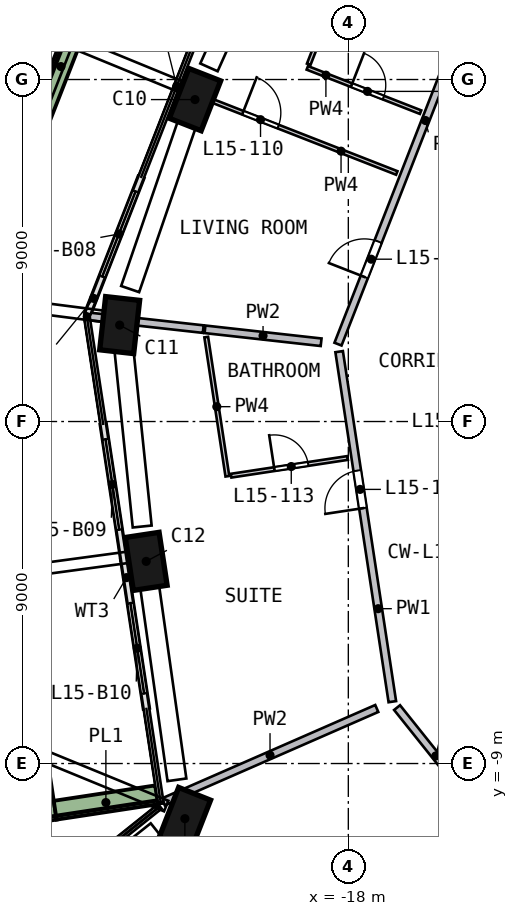
"""IFC4 building model, lengths in metres.
Left out: names, types, materials, properties, quantities, classifications, styles, units other than length and angle.
Written with IfcOpenShell. Run it as: python <this file> out.ifc"""

import sys

from ifc_helpers import new_model, si_unit, direction, frame, frame_2d, origin, origin_2d, place, context, subcontext, project, spatial, rectangle, extrude, element, fill, save


model = new_model("IFC4")
c1 = context("Model", 3, precision=1e-05, world=origin(), true_north=direction((0.0, 1.0)))
c2 = subcontext(c1, "Body", "Model", "MODEL_VIEW")
j1 = project(units=[si_unit("LENGTHUNIT", "METRE"), si_unit("PLANEANGLEUNIT", "RADIAN")], contexts=[c1])
p1 = place(None, origin())
s1 = spatial("IfcSite", under=j1, at=p1, CompositionType="ELEMENT")
p2 = place(p1, origin())
s2 = spatial("IfcBuilding", under=s1, at=p2, CompositionType="ELEMENT")
p3 = place(p2, frame((0.0, 0.0, 68.0)))
s3 = spatial("IfcBuildingStorey", under=s2, at=p3, CompositionType="ELEMENT", Elevation=68.0)
p4 = place(p3, frame((-21.987, 8.599, 0.0), z_axis=(-0.040002437, -0.104949359, 0.993672701), x_axis=(-0.361776799, -0.925474949, -0.112310579)))
e1 = element("IfcColumn", 1, at=p4, inside=s3, PredefinedType="COLUMN", context=c2, shape_type="SweptSolid", body=[
    extrude(rectangle(XDim=1.4, YDim=0.9, at=origin_2d()), origin(), (0.0, 0.0, 1.0), 3.21),
])
p5 = place(p3, frame((-24.003, 2.675, 0.0), z_axis=(-0.011708401, -0.11419492, 0.993389367), x_axis=(0.109706748, 0.987313425, 0.1147895)))
e2 = element("IfcColumn", 2, at=p5, inside=s3, PredefinedType="COLUMN", context=c2, shape_type="SweptSolid", body=[
    extrude(rectangle(XDim=1.4, YDim=0.9, at=origin_2d()), origin(), (0.0, 0.0, 1.0), 3.211),
])
p6 = place(p3, frame((-23.34, -3.547, 0.0), z_axis=(0.01779579, -0.110881458, 0.993674299), x_axis=(0.149132846, -0.982419922, -0.112296444)))
e3 = element("IfcColumn", 3, at=p6, inside=s3, PredefinedType="COLUMN", context=c2, shape_type="SweptSolid", body=[
    extrude(rectangle(XDim=1.4, YDim=0.9, at=origin_2d()), origin(), (0.0, 0.0, 1.0), 3.21),
])
p7 = place(p3, frame((-22.361, -10.323, 0.0), z_axis=(0.050013261, -0.105879139, 0.993120477), x_axis=(0.3690452, 0.925950511, 0.080132965)))
e4 = element("IfcColumn", 4, at=p7, inside=s3, PredefinedType="COLUMN", context=c2, shape_type="SweptSolid", body=[
    extrude(rectangle(XDim=1.4, YDim=0.9, at=origin_2d()), origin(), (0.0, 0.0, 1.0), 3.212),
])
p8 = place(p3, frame((-23.454, 6.426, 0.0), z_axis=(0.0, 0.0, 1.0), x_axis=(-0.364257976, -0.931298087, 0.0)))
e5 = element("IfcWall", 5, at=p8, inside=s3, PredefinedType="SOLIDWALL", context=c2, shape_type="SweptSolid", body=[
    extrude(rectangle(XDim=3.842, YDim=0.15, at=frame_2d((1.921, 0.0))), origin(), (0.0, 0.0, 1.0), 2.425),
])
p9 = place(p8, frame((0.4, 0.0, 0.0)))
e6 = element("IfcOpeningElement", 6, at=p9, cuts=e5, PredefinedType="OPENING", context=c2, shape_type="SweptSolid", body=[
    extrude(rectangle(XDim=2.4, YDim=2.4, at=frame_2d((1.2, 1.2))), frame((0.0, 0.085, 0.0), z_axis=(0.0, -1.0, 0.0), x_axis=(1.0, 0.0, 0.0)), (0.0, 0.0, 1.0), 0.17),
])
p10 = place(p3, frame((-24.45, -0.074, 0.0), z_axis=(0.0, 0.0, 1.0), x_axis=(0.150207135, -0.988654549, 0.0)))
e7 = element("IfcWall", 7, at=p10, inside=s3, PredefinedType="SOLIDWALL", context=c2, shape_type="SweptSolid", body=[
    extrude(rectangle(XDim=3.6, YDim=0.15, at=frame_2d((1.8, 0.0))), origin(), (0.0, 0.0, 1.0), 2.425),
])
p11 = place(p10, frame((0.4, 0.0, 0.0)))
e8 = element("IfcOpeningElement", 8, at=p11, cuts=e7, PredefinedType="OPENING", context=c2, shape_type="SweptSolid", body=[
    extrude(rectangle(XDim=2.4, YDim=2.4, at=frame_2d((1.2, 1.2))), frame((0.0, 0.085, 0.0), z_axis=(0.0, -1.0, 0.0), x_axis=(1.0, 0.0, 0.0)), (0.0, 0.0, 1.0), 0.17),
])
p12 = place(p3, frame((-23.909, -3.633, 0.0), z_axis=(0.0, 0.0, 1.0), x_axis=(0.150227192, -0.988651501, 0.0)))
e9 = element("IfcWall", 9, at=p12, inside=s3, PredefinedType="SOLIDWALL", context=c2, shape_type="SweptSolid", body=[
    extrude(rectangle(XDim=3.96, YDim=0.15, at=frame_2d((1.98, 0.0))), origin(), (0.0, 0.0, 1.0), 2.425),
])
p13 = place(p12, frame((1.16, 0.0, 0.0)))
e10 = element("IfcOpeningElement", 10, at=p13, cuts=e9, PredefinedType="OPENING", context=c2, shape_type="SweptSolid", body=[
    extrude(rectangle(XDim=2.4, YDim=2.4, at=frame_2d((1.2, 1.2))), frame((0.0, 0.085, 0.0), z_axis=(0.0, -1.0, 0.0), x_axis=(1.0, 0.0, 0.0)), (0.0, 0.0, 1.0), 0.17),
])
p14 = place(p3, frame((-23.154, 15.498, 0.0), z_axis=(0.0, 0.0, 1.0), x_axis=(-0.364230183, -0.931308957, 0.0)))
e11 = element("IfcWall", 11, at=p14, inside=s3, PredefinedType="SOLIDWALL", context=c2, shape_type="SweptSolid", body=[
    extrude(rectangle(XDim=13.224, YDim=0.5, at=frame_2d((6.612, 0.0))), origin(), (0.0, 0.0, 1.0), 0.7),
])
p15 = place(p3, frame((-27.985, 3.054, 0.0), z_axis=(0.0, 0.0, 1.0), x_axis=(0.150217471, -0.988652978, 0.0)))
e12 = element("IfcWall", 12, at=p15, inside=s3, PredefinedType="SOLIDWALL", context=c2, shape_type="SweptSolid", body=[
    extrude(rectangle(XDim=13.724, YDim=0.5, at=frame_2d((6.862, 0.0))), origin(), (0.0, 0.0, 1.0), 0.7),
])
p16 = place(p3, frame((-25.713, -10.229, 0.0), z_axis=(0.0, 0.0, 1.0), x_axis=(0.988647191, 0.150255557, 0.0)))
e13 = element("IfcWall", 13, at=p16, inside=s3, PredefinedType="SOLIDWALL", context=c2, shape_type="SweptSolid", body=[
    extrude(rectangle(XDim=2.699, YDim=0.5, at=frame_2d((1.349, 0.0))), origin(), (0.0, 0.0, 1.0), 0.7),
])
p17 = place(p3, frame((-26.85, -20.057, 0.0), z_axis=(0.0, 0.0, 1.0), x_axis=(0.78108065, 0.624430155, 0.0)))
e14 = element("IfcWall", 14, at=p17, inside=s3, PredefinedType="SOLIDWALL", context=c2, shape_type="SweptSolid", body=[
    extrude(rectangle(XDim=15.738, YDim=0.2, at=frame_2d((7.869, 0.0))), origin(), (0.0, 0.0, 1.0), 3.19),
])
p18 = place(p17, frame((9.769, 0.0, 0.0)))
e15 = element("IfcOpeningElement", 15, at=p18, cuts=e14, PredefinedType="OPENING", context=c2, shape_type="SweptSolid", body=[
    extrude(rectangle(XDim=1.0, YDim=2.1, at=frame_2d((0.5, 1.05))), frame((0.0, 0.11, 0.0), z_axis=(0.0, -1.0, 0.0), x_axis=(1.0, 0.0, 0.0)), (0.0, 0.0, 1.0), 0.22),
])
p19 = place(p3, frame((-16.842, -7.372, 0.0), z_axis=(0.0, 0.0, 1.0), x_axis=(-0.150231533, 0.988650842, 0.0)))
e16 = element("IfcWall", 16, at=p19, inside=s3, PredefinedType="SOLIDWALL", context=c2, shape_type="SweptSolid", body=[
    extrude(rectangle(XDim=9.317, YDim=0.2, at=frame_2d((4.658, 0.0))), origin(), (0.0, 0.0, 1.0), 3.19),
])
p20 = place(p19, frame((5.15, 0.0, 0.0)))
e17 = element("IfcOpeningElement", 17, at=p20, cuts=e16, PredefinedType="OPENING", context=c2, shape_type="SweptSolid", body=[
    extrude(rectangle(XDim=1.0, YDim=2.1, at=frame_2d((0.5, 1.05))), frame((0.0, 0.11, 0.0), z_axis=(0.0, -1.0, 0.0), x_axis=(1.0, 0.0, 0.0)), (0.0, 0.0, 1.0), 0.22),
])
p21 = place(p3, frame((-18.271, 2.037, 0.0), z_axis=(0.0, 0.0, 1.0), x_axis=(0.364215942, 0.931314527, 0.0)))
e18 = element("IfcWall", 18, at=p21, inside=s3, PredefinedType="SOLIDWALL", context=c2, shape_type="SweptSolid", body=[
    extrude(rectangle(XDim=9.537, YDim=0.2, at=frame_2d((4.768, 0.0))), origin(), (0.0, 0.0, 1.0), 3.19),
])
p22 = place(p21, frame((1.9, 0.0, 0.0)))
e19 = element("IfcOpeningElement", 19, at=p22, cuts=e18, PredefinedType="OPENING", context=c2, shape_type="SweptSolid", body=[
    extrude(rectangle(XDim=1.0, YDim=2.1, at=frame_2d((0.5, 1.05))), frame((0.0, 0.11, 0.0), z_axis=(0.0, -1.0, 0.0), x_axis=(1.0, 0.0, 0.0)), (0.0, 0.0, 1.0), 0.22),
])
p23 = place(p3, frame((-16.717, -7.528, 0.0), z_axis=(0.0, 0.0, 1.0), x_axis=(0.624411725, -0.781095383, 0.0)))
e20 = element("IfcWall", 20, at=p23, inside=s3, PredefinedType="SOLIDWALL", context=c2, shape_type="SweptSolid", body=[
    extrude(rectangle(XDim=3.258, YDim=0.2, at=frame_2d((1.629, 0.0))), origin(), (0.0, 0.0, 1.0), 3.19),
])
p24 = place(p3, frame((-21.817, 2.432, 0.0), z_axis=(0.0, 0.0, 1.0), x_axis=(-0.993849082, 0.110742952, 0.0)))
e21 = element("IfcWall", 21, at=p24, inside=s3, PredefinedType="SOLIDWALL", context=c2, shape_type="SweptSolid", body=[
    extrude(rectangle(XDim=3.011, YDim=0.2, at=frame_2d((1.506, 0.0))), origin(), (0.0, 0.0, 1.0), 2.69),
])
p25 = place(p3, frame((-18.716, 2.086, 0.0), z_axis=(0.0, 0.0, 1.0), x_axis=(-0.993846884, 0.110762675, 0.0)))
e22 = element("IfcWall", 22, at=p25, inside=s3, PredefinedType="SOLIDWALL", context=c2, shape_type="SweptSolid", body=[
    extrude(rectangle(XDim=3.075, YDim=0.2, at=frame_2d((1.537, 0.0))), origin(), (0.0, 0.0, 1.0), 3.19),
])
p26 = place(p3, frame((-17.252, -7.552, 0.0), z_axis=(0.0, 0.0, 1.0), x_axis=(-0.916090617, -0.400971298, 0.0)))
e23 = element("IfcWall", 23, at=p26, inside=s3, PredefinedType="SOLIDWALL", context=c2, shape_type="SweptSolid", body=[
    extrude(rectangle(XDim=6.132, YDim=0.2, at=frame_2d((3.066, 0.0))), origin(), (0.0, 0.0, 1.0), 3.19),
])
p27 = place(p3, frame((-21.182, -1.44, 0.0), z_axis=(0.0, 0.0, 1.0), x_axis=(-0.150219315, 0.988652698, 0.0)))
e24 = element("IfcWall", 24, at=p27, inside=s3, PredefinedType="PARTITIONING", context=c2, shape_type="SweptSolid", body=[
    extrude(rectangle(XDim=3.704, YDim=0.1, at=frame_2d((1.852, 0.0))), origin(), (0.0, 0.0, 1.0), 3.19),
])
p28 = place(p3, frame((-22.452, 8.781, 0.0), z_axis=(0.0, 0.0, 1.0), x_axis=(0.93131012, -0.36422721, 0.0)))
e25 = element("IfcWall", 25, at=p28, inside=s3, PredefinedType="PARTITIONING", context=c2, shape_type="SweptSolid", body=[
    extrude(rectangle(XDim=6.15, YDim=0.1, at=frame_2d((3.075, 0.0))), origin(), (0.0, 0.0, 1.0), 3.19),
])
p29 = place(p28, frame((1.8, 0.0, 0.0)))
e26 = element("IfcOpeningElement", 26, at=p29, cuts=e25, PredefinedType="OPENING", context=c2, shape_type="SweptSolid", body=[
    extrude(rectangle(XDim=1.0, YDim=2.1, at=frame_2d((0.5, 1.05))), frame((0.0, 0.06, 0.0), z_axis=(0.0, -1.0, 0.0), x_axis=(1.0, 0.0, 0.0)), (0.0, 0.0, 1.0), 0.12),
])
p30 = place(p3, frame((-21.083, -1.425, 0.0), z_axis=(0.0, 0.0, 1.0), x_axis=(0.988656748, 0.150192657, 0.0)))
e27 = element("IfcWall", 27, at=p30, inside=s3, PredefinedType="PARTITIONING", context=c2, shape_type="SweptSolid", body=[
    extrude(rectangle(XDim=3.1, YDim=0.1, at=frame_2d((1.55, 0.0))), origin(), (0.0, 0.0, 1.0), 3.19),
])
p31 = place(p30, frame((1.15, 0.0, 0.0)))
e28 = element("IfcOpeningElement", 28, at=p31, cuts=e27, PredefinedType="OPENING", context=c2, shape_type="SweptSolid", body=[
    extrude(rectangle(XDim=0.9, YDim=2.1, at=frame_2d((0.45, 1.05))), frame((0.0, 0.06, 0.0), z_axis=(0.0, -1.0, 0.0), x_axis=(1.0, 0.0, 0.0)), (0.0, 0.0, 1.0), 0.12),
])
p32 = place(p3, frame((-17.982, 12.112, 0.0), z_axis=(0.0, 0.0, 1.0), x_axis=(-0.364209666, -0.931316981, 0.0)))
e29 = element("IfcWall", 29, at=p32, inside=s3, PredefinedType="PARTITIONING", context=c2, shape_type="SweptSolid", body=[
    extrude(rectangle(XDim=2.912, YDim=0.1, at=frame_2d((1.456, 0.0))), origin(), (0.0, 0.0, 1.0), 3.19),
])
p33 = place(p3, frame((-19.079, 9.307, 0.0), z_axis=(0.0, 0.0, 1.0), x_axis=(0.931311427, -0.364223868, 0.0)))
e30 = element("IfcWall", 30, at=p33, inside=s3, PredefinedType="PARTITIONING", context=c2, shape_type="SweptSolid", body=[
    extrude(rectangle(XDim=3.2, YDim=0.1, at=frame_2d((1.6, 0.0))), origin(), (0.0, 0.0, 1.0), 3.19),
])
p34 = place(p33, frame((1.25, 0.0, 0.0)))
e31 = element("IfcOpeningElement", 31, at=p34, cuts=e30, PredefinedType="OPENING", context=c2, shape_type="SweptSolid", body=[
    extrude(rectangle(XDim=0.9, YDim=2.1, at=frame_2d((0.45, 1.05))), frame((0.0, 0.06, 0.0), z_axis=(0.0, -1.0, 0.0), x_axis=(1.0, 0.0, 0.0)), (0.0, 0.0, 1.0), 0.12),
])
p35 = place(p9, origin())
e32 = element("IfcDoor", 32, at=p35, inside=s3, OperationType="SLIDING_TO_RIGHT", PredefinedType="DOOR", context=c2, shape_type="SweptSolid", body=[
    extrude(rectangle(XDim=2.4, YDim=2.4, at=frame_2d((1.2, 1.2))), frame((0.0, 0.025, 0.0), z_axis=(0.0, -1.0, 0.0), x_axis=(1.0, 0.0, 0.0)), (0.0, 0.0, 1.0), 0.05),
])
fill(e6, e32)
p36 = place(p11, origin())
e33 = element("IfcDoor", 33, at=p36, inside=s3, OperationType="SLIDING_TO_RIGHT", PredefinedType="DOOR", context=c2, shape_type="SweptSolid", body=[
    extrude(rectangle(XDim=2.4, YDim=2.4, at=frame_2d((1.2, 1.2))), frame((0.0, 0.025, 0.0), z_axis=(0.0, -1.0, 0.0), x_axis=(1.0, 0.0, 0.0)), (0.0, 0.0, 1.0), 0.05),
])
fill(e8, e33)
p37 = place(p13, origin())
e34 = element("IfcDoor", 34, at=p37, inside=s3, OperationType="SLIDING_TO_LEFT", PredefinedType="DOOR", context=c2, shape_type="SweptSolid", body=[
    extrude(rectangle(XDim=2.4, YDim=2.4, at=frame_2d((1.2, 1.2))), frame((0.0, 0.025, 0.0), z_axis=(0.0, -1.0, 0.0), x_axis=(1.0, 0.0, 0.0)), (0.0, 0.0, 1.0), 0.05),
])
fill(e10, e34)
p38 = place(p22, origin())
e35 = element("IfcDoor", 35, at=p38, inside=s3, OperationType="SINGLE_SWING_LEFT", PredefinedType="DOOR", context=c2, shape_type="SweptSolid", body=[
    extrude(rectangle(XDim=1.0, YDim=2.1, at=frame_2d((0.5, 1.05))), frame((0.0, 0.025, 0.0), z_axis=(0.0, -1.0, 0.0), x_axis=(1.0, 0.0, 0.0)), (0.0, 0.0, 1.0), 0.05),
])
fill(e19, e35)
p39 = place(p29, origin())
e36 = element("IfcDoor", 36, at=p39, inside=s3, OperationType="SINGLE_SWING_LEFT", PredefinedType="DOOR", context=c2, shape_type="SweptSolid", body=[
    extrude(rectangle(XDim=1.0, YDim=2.1, at=frame_2d((0.5, 1.05))), frame((0.0, 0.025, 0.0), z_axis=(0.0, -1.0, 0.0), x_axis=(1.0, 0.0, 0.0)), (0.0, 0.0, 1.0), 0.05),
])
fill(e26, e36)
p40 = place(p34, origin())
e37 = element("IfcDoor", 37, at=p40, inside=s3, OperationType="SINGLE_SWING_LEFT", PredefinedType="DOOR", context=c2, shape_type="SweptSolid", body=[
    extrude(rectangle(XDim=0.9, YDim=2.1, at=frame_2d((0.45, 1.05))), frame((0.0, 0.025, 0.0), z_axis=(0.0, -1.0, 0.0), x_axis=(1.0, 0.0, 0.0)), (0.0, 0.0, 1.0), 0.05),
])
fill(e31, e37)
p41 = place(p20, origin())
e38 = element("IfcDoor", 38, at=p41, inside=s3, OperationType="SINGLE_SWING_LEFT", PredefinedType="DOOR", context=c2, shape_type="SweptSolid", body=[
    extrude(rectangle(XDim=1.0, YDim=2.1, at=frame_2d((0.5, 1.05))), frame((0.0, 0.025, 0.0), z_axis=(0.0, -1.0, 0.0), x_axis=(1.0, 0.0, 0.0)), (0.0, 0.0, 1.0), 0.05),
])
fill(e17, e38)
p42 = place(p31, origin())
e39 = element("IfcDoor", 39, at=p42, inside=s3, OperationType="SINGLE_SWING_LEFT", PredefinedType="DOOR", context=c2, shape_type="SweptSolid", body=[
    extrude(rectangle(XDim=0.9, YDim=2.1, at=frame_2d((0.45, 1.05))), frame((0.0, 0.025, 0.0), z_axis=(0.0, -1.0, 0.0), x_axis=(1.0, 0.0, 0.0)), (0.0, 0.0, 1.0), 0.05),
])
fill(e28, e39)
save(model, sys.argv[1])
